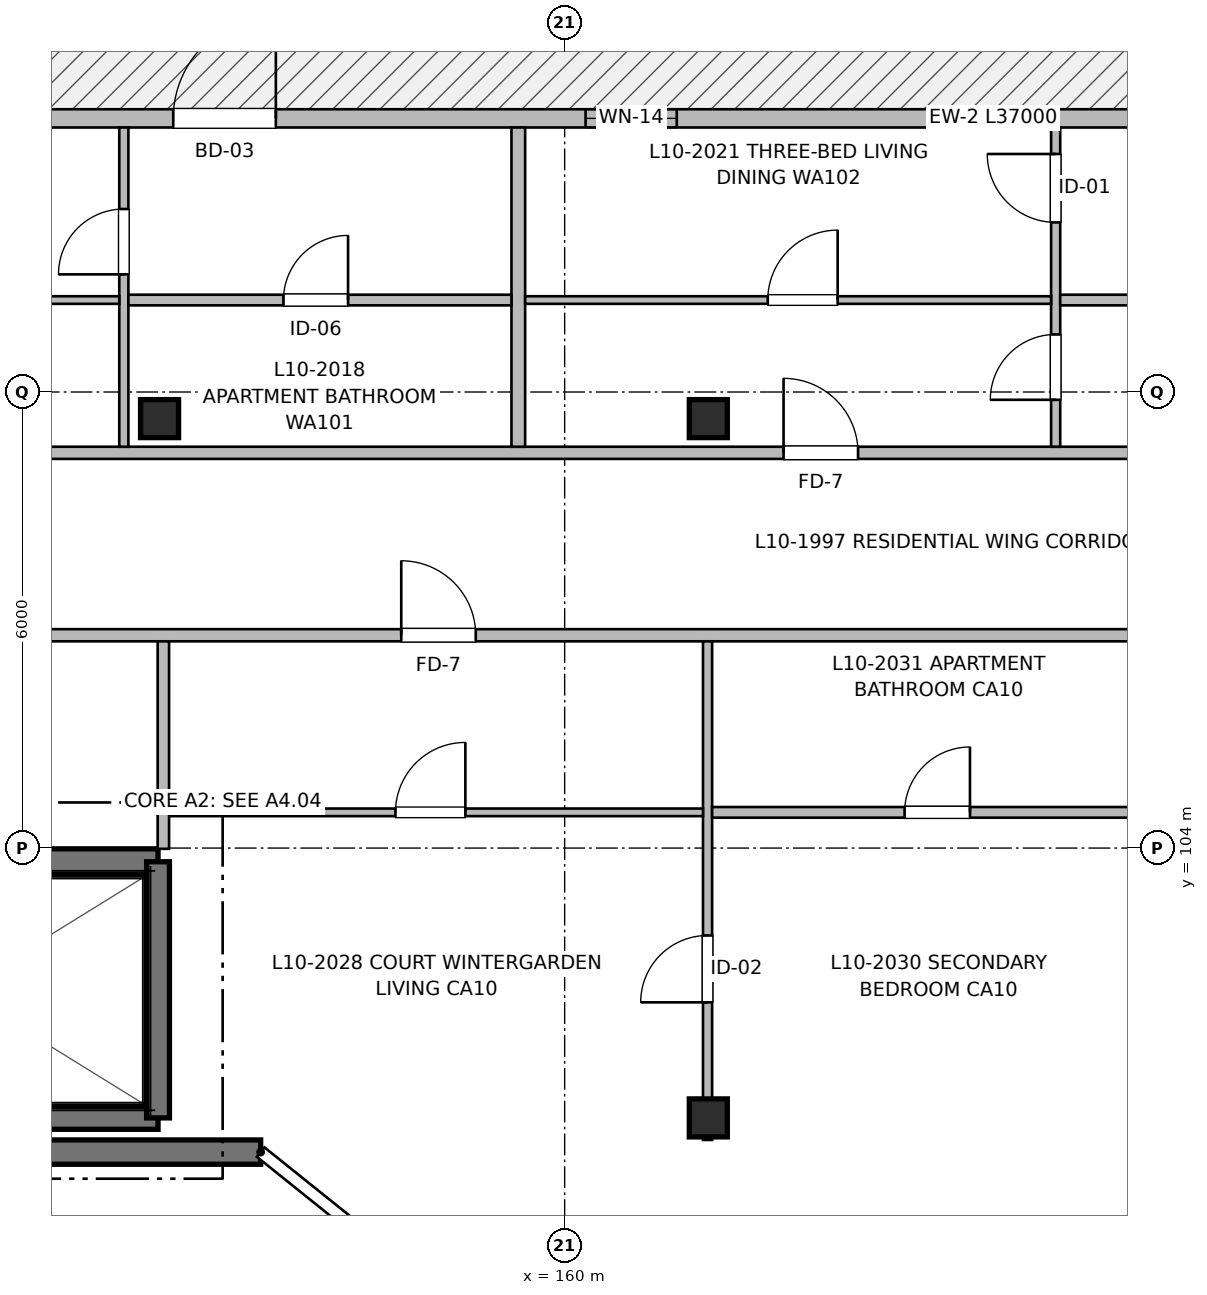
"""IFC4 building model, lengths in metres.
Left out: names, types, materials, properties, quantities, classifications, styles, units other than length and angle.
Written with IfcOpenShell. Run it as: python <this file> out.ifc"""

import sys

from ifc_helpers import new_model, si_unit, direction, frame, frame_2d, origin, origin_2d, place, context, subcontext, project, spatial, rectangle, extrude, element, fill, save


model = new_model("IFC4")
c1 = context("Model", 3, precision=1e-05, world=origin(), true_north=direction((0.0, 1.0)))
c2 = subcontext(c1, "Body", "Model", "MODEL_VIEW")
j1 = project(units=[si_unit("LENGTHUNIT", "METRE"), si_unit("PLANEANGLEUNIT", "RADIAN")], contexts=[c1])
p1 = place(None, origin())
s1 = spatial("IfcSite", under=j1, at=p1, CompositionType="ELEMENT")
p2 = place(p1, origin())
s2 = spatial("IfcBuilding", under=s1, at=p2, CompositionType="ELEMENT")
p3 = place(p2, frame((0.0, 0.0, 32.96)))
s3 = spatial("IfcBuildingStorey", under=s2, at=p3, CompositionType="ELEMENT", Elevation=32.96)
for number, where, z_axis, x_axis in (
    (1, (154.67, 109.65, 0.0), (0.0, 0.0, 1.0), (1.0, 0.0, 0.0)),
    (2, (161.89, 100.45, 0.0), (0.0, 0.0, 1.0), (1.0, 0.0, 0.0)),
    (3, (161.89, 109.65, 0.0), (0.0, 0.0, 1.0), (1.0, 0.0, 0.0)),
):
    element("IfcColumn", number, at=place(p3, frame(where, z_axis=z_axis, x_axis=x_axis)), inside=s3, PredefinedType="COLUMN", context=c2, shape_type="SweptSolid", body=[
        extrude(rectangle(XDim=0.5, YDim=0.5, at=origin_2d()), origin(), (0.0, 0.0, 1.0), 3.2),
    ])
p4 = place(p3, frame((147.75, 100.45, 0.0), z_axis=(0.0, 0.0, 1.0), x_axis=(1.0, 0.0, 0.0)))
e4 = element("IfcWall", 4, at=p4, inside=s3, PredefinedType="SHEAR", context=c2, shape_type="SweptSolid", body=[
    extrude(rectangle(XDim=6.9, YDim=0.3, at=frame_2d((3.45, 0.0))), origin(), (0.0, 0.0, 1.0), 3.2),
])
p5 = place(p3, frame((154.65, 103.82, 0.0), z_axis=(0.0, 0.0, 1.0), x_axis=(-1.0, 0.0, 0.0)))
e5 = element("IfcWall", 5, at=p5, inside=s3, PredefinedType="SHEAR", context=c2, shape_type="SweptSolid", body=[
    extrude(rectangle(XDim=6.9, YDim=0.34, at=frame_2d((3.45, 0.0))), origin(), (0.0, 0.0, 1.0), 3.2),
])
p6 = place(p5, frame((5.25, 0.0, 0.0)))
e6 = element("IfcOpeningElement", 6, at=p6, cuts=e5, PredefinedType="OPENING", context=c2, shape_type="SweptSolid", body=[
    extrude(rectangle(XDim=1.05, YDim=2.15, at=frame_2d((0.525, 1.075))), frame((0.0, 0.18, 0.0), z_axis=(0.0, -1.0, 0.0), x_axis=(1.0, 0.0, 0.0)), (0.0, 0.0, 1.0), 0.36),
])
p7 = place(p3, frame((154.65, 100.45, 0.0), z_axis=(0.0, 0.0, 1.0), x_axis=(0.0, 1.0, 0.0)))
e7 = element("IfcWall", 7, at=p7, inside=s3, PredefinedType="SHEAR", context=c2, shape_type="SweptSolid", body=[
    extrude(rectangle(XDim=3.37, YDim=0.3, at=frame_2d((1.685, 0.0))), origin(), (0.0, 0.0, 1.0), 3.2),
])
p8 = place(p3, frame((147.0, 113.6, 0.0), z_axis=(0.0, 0.0, 1.0), x_axis=(1.0, 0.0, 0.0)))
e8 = element("IfcWall", 8, at=p8, inside=s3, PredefinedType="SOLIDWALL", context=c2, shape_type="SweptSolid", body=[
    extrude(rectangle(XDim=37.0, YDim=0.24, at=frame_2d((18.5, 0.0))), origin(), (0.0, 0.0, 1.0), 2.98),
])
p9 = place(p8, frame((7.85, 0.0, 0.0)))
e9 = element("IfcOpeningElement", 9, at=p9, cuts=e8, PredefinedType="OPENING", context=c2, shape_type="SweptSolid", body=[
    extrude(rectangle(XDim=1.35, YDim=2.2, at=frame_2d((0.675, 1.1))), frame((0.0, 0.13, 0.0), z_axis=(0.0, -1.0, 0.0), x_axis=(1.0, 0.0, 0.0)), (0.0, 0.0, 1.0), 0.26),
])
p10 = place(p8, frame((4.1, 0.0, 0.9)))
e10 = element("IfcOpeningElement", 10, at=p10, cuts=e8, PredefinedType="OPENING", context=c2, shape_type="SweptSolid", body=[
    extrude(rectangle(XDim=1.05, YDim=1.15, at=frame_2d((0.525, 0.575))), frame((0.0, 0.13, 0.0), z_axis=(0.0, -1.0, 0.0), x_axis=(1.0, 0.0, 0.0)), (0.0, 0.0, 1.0), 0.26),
])
p11 = place(p8, frame((13.275, 0.0, 0.9)))
e11 = element("IfcOpeningElement", 11, at=p11, cuts=e8, PredefinedType="OPENING", context=c2, shape_type="SweptSolid", body=[
    extrude(rectangle(XDim=1.2, YDim=1.05, at=frame_2d((0.6, 0.525))), frame((0.0, 0.13, 0.0), z_axis=(0.0, -1.0, 0.0), x_axis=(1.0, 0.0, 0.0)), (0.0, 0.0, 1.0), 0.26),
])
p12 = place(p8, frame((22.8, 0.0, 0.9)))
e12 = element("IfcOpeningElement", 12, at=p12, cuts=e8, PredefinedType="OPENING", context=c2, shape_type="SweptSolid", body=[
    extrude(rectangle(XDim=0.65, YDim=0.95, at=frame_2d((0.325, 0.475))), frame((0.0, 0.13, 0.0), z_axis=(0.0, -1.0, 0.0), x_axis=(1.0, 0.0, 0.0)), (0.0, 0.0, 1.0), 0.26),
])
p13 = place(p8, frame((32.275, 0.0, 0.62)))
e13 = element("IfcOpeningElement", 13, at=p13, cuts=e8, PredefinedType="OPENING", context=c2, shape_type="SweptSolid", body=[
    extrude(rectangle(XDim=1.1, YDim=1.6, at=frame_2d((0.55, 0.8))), frame((0.0, 0.13, 0.0), z_axis=(0.0, -1.0, 0.0), x_axis=(1.0, 0.0, 0.0)), (0.0, 0.0, 1.0), 0.26),
])
p14 = place(p8, frame((27.445, 0.0, 0.82)))
e14 = element("IfcOpeningElement", 14, at=p14, cuts=e8, PredefinedType="OPENING", context=c2, shape_type="SweptSolid", body=[
    extrude(rectangle(XDim=1.5, YDim=1.4, at=frame_2d((0.75, 0.7))), frame((0.0, 0.13, 0.0), z_axis=(0.0, -1.0, 0.0), x_axis=(1.0, 0.0, 0.0)), (0.0, 0.0, 1.0), 0.26),
])
p15 = place(p3, frame((156.0, 100.0, 0.0), z_axis=(0.0, 0.0, 1.0), x_axis=(-1.0, 0.0, 0.0)))
e15 = element("IfcWall", 15, at=p15, inside=s3, PredefinedType="SHEAR", context=c2, shape_type="SweptSolid", body=[
    extrude(rectangle(XDim=9.0, YDim=0.32, at=frame_2d((4.5, 0.0))), origin(), (0.0, 0.0, 1.0), 2.98),
])
p16 = place(p15, frame((3.975, 0.0, 0.9)))
e16 = element("IfcOpeningElement", 16, at=p16, cuts=e15, PredefinedType="OPENING", context=c2, shape_type="SweptSolid", body=[
    extrude(rectangle(XDim=1.05, YDim=1.15, at=frame_2d((0.525, 0.575))), frame((0.0, 0.17, 0.0), z_axis=(0.0, -1.0, 0.0), x_axis=(1.0, 0.0, 0.0)), (0.0, 0.0, 1.0), 0.34),
])
p17 = place(p3, frame((147.16, 106.8, 0.0), z_axis=(0.0, 0.0, 1.0), x_axis=(1.0, 0.0, 0.0)))
e17 = element("IfcWall", 17, at=p17, inside=s3, PredefinedType="PARTITIONING", context=c2, shape_type="SweptSolid", body=[
    extrude(rectangle(XDim=27.64, YDim=0.16, at=frame_2d((13.82, 0.0))), origin(), (0.0, 0.0, 1.0), 2.935),
])
p18 = place(p17, frame((3.515, 0.0, 0.0)))
e18 = element("IfcOpeningElement", 18, at=p18, cuts=e17, PredefinedType="OPENING", context=c2, shape_type="SweptSolid", body=[
    extrude(rectangle(XDim=1.05, YDim=2.15, at=frame_2d((0.525, 1.075))), frame((0.0, 0.09, 0.0), z_axis=(0.0, -1.0, 0.0), x_axis=(1.0, 0.0, 0.0)), (0.0, 0.0, 1.0), 0.18),
])
p19 = place(p17, frame((10.69, 0.0, 0.0)))
e19 = element("IfcOpeningElement", 19, at=p19, cuts=e17, PredefinedType="OPENING", context=c2, shape_type="SweptSolid", body=[
    extrude(rectangle(XDim=0.98, YDim=2.15, at=frame_2d((0.49, 1.075))), frame((0.0, 0.09, 0.0), z_axis=(0.0, -1.0, 0.0), x_axis=(1.0, 0.0, 0.0)), (0.0, 0.0, 1.0), 0.18),
])
p20 = place(p3, frame((147.16, 109.2, 0.0), z_axis=(0.0, 0.0, 1.0), x_axis=(1.0, 0.0, 0.0)))
e20 = element("IfcWall", 20, at=p20, inside=s3, PredefinedType="PARTITIONING", context=c2, shape_type="SweptSolid", body=[
    extrude(rectangle(XDim=36.68, YDim=0.16, at=frame_2d((18.34, 0.0))), origin(), (0.0, 0.0, 1.0), 2.935),
])
p21 = place(p20, frame((3.03, 0.0, 0.0)))
e21 = element("IfcOpeningElement", 21, at=p21, cuts=e20, PredefinedType="OPENING", context=c2, shape_type="SweptSolid", body=[
    extrude(rectangle(XDim=0.98, YDim=2.15, at=frame_2d((0.49, 1.075))), frame((0.0, 0.09, 0.0), z_axis=(0.0, -1.0, 0.0), x_axis=(1.0, 0.0, 0.0)), (0.0, 0.0, 1.0), 0.18),
])
p22 = place(p20, frame((15.72, 0.0, 0.0)))
e22 = element("IfcOpeningElement", 22, at=p22, cuts=e20, PredefinedType="OPENING", context=c2, shape_type="SweptSolid", body=[
    extrude(rectangle(XDim=0.98, YDim=2.15, at=frame_2d((0.49, 1.075))), frame((0.0, 0.09, 0.0), z_axis=(0.0, -1.0, 0.0), x_axis=(1.0, 0.0, 0.0)), (0.0, 0.0, 1.0), 0.18),
])
p23 = place(p20, frame((27.57, 0.0, 0.0)))
e23 = element("IfcOpeningElement", 23, at=p23, cuts=e20, PredefinedType="OPENING", context=c2, shape_type="SweptSolid", body=[
    extrude(rectangle(XDim=0.98, YDim=2.15, at=frame_2d((0.49, 1.075))), frame((0.0, 0.09, 0.0), z_axis=(0.0, -1.0, 0.0), x_axis=(1.0, 0.0, 0.0)), (0.0, 0.0, 1.0), 0.18),
])
p24 = place(p3, frame((154.72, 103.99, 0.0), z_axis=(0.0, 0.0, 1.0), x_axis=(0.0, 1.0, 0.0)))
e24 = element("IfcWall", 24, at=p24, inside=s3, PredefinedType="PARTITIONING", context=c2, shape_type="SweptSolid", body=[
    extrude(rectangle(XDim=2.73, YDim=0.15, at=frame_2d((1.365, 0.0))), origin(), (0.0, 0.0, 1.0), 2.935),
])
p25 = place(p3, frame((159.39, 109.28, 0.0), z_axis=(0.0, 0.0, 1.0), x_axis=(0.0, 1.0, 0.0)))
e25 = element("IfcWall", 25, at=p25, inside=s3, PredefinedType="PARTITIONING", context=c2, shape_type="SweptSolid", body=[
    extrude(rectangle(XDim=4.2, YDim=0.18, at=frame_2d((2.1, 0.0))), origin(), (0.0, 0.0, 1.0), 2.935),
])
p26 = place(p3, frame((154.2, 109.28, 0.0), z_axis=(0.0, 0.0, 1.0), x_axis=(0.0, 1.0, 0.0)))
e26 = element("IfcWall", 26, at=p26, inside=s3, PredefinedType="PARTITIONING", context=c2, shape_type="SweptSolid", body=[
    extrude(rectangle(XDim=4.2, YDim=0.12, at=frame_2d((2.1, 0.0))), origin(), (0.0, 0.0, 1.0), 2.935),
])
p27 = place(p26, frame((2.268, 0.0, 0.0)))
e27 = element("IfcOpeningElement", 27, at=p27, cuts=e26, PredefinedType="OPENING", context=c2, shape_type="SweptSolid", body=[
    extrude(rectangle(XDim=0.86, YDim=2.1, at=frame_2d((0.43, 1.05))), frame((0.0, 0.07, 0.0), z_axis=(0.0, -1.0, 0.0), x_axis=(1.0, 0.0, 0.0)), (0.0, 0.0, 1.0), 0.14),
])
p28 = place(p3, frame((154.26, 111.21, 0.0), z_axis=(0.0, 0.0, 1.0), x_axis=(1.0, 0.0, 0.0)))
e28 = element("IfcWall", 28, at=p28, inside=s3, PredefinedType="PARTITIONING", context=c2, shape_type="SweptSolid", body=[
    extrude(rectangle(XDim=5.04, YDim=0.14, at=frame_2d((2.52, 0.0))), origin(), (0.0, 0.0, 1.0), 2.935),
])
p29 = place(p28, frame((2.04, 0.0, 0.0)))
e29 = element("IfcOpeningElement", 29, at=p29, cuts=e28, PredefinedType="OPENING", context=c2, shape_type="SweptSolid", body=[
    extrude(rectangle(XDim=0.85, YDim=2.05, at=frame_2d((0.425, 1.025))), frame((0.0, 0.08, 0.0), z_axis=(0.0, -1.0, 0.0), x_axis=(1.0, 0.0, 0.0)), (0.0, 0.0, 1.0), 0.16),
])
p30 = place(p3, frame((147.16, 111.21, 0.0), z_axis=(0.0, 0.0, 1.0), x_axis=(1.0, 0.0, 0.0)))
e30 = element("IfcWall", 30, at=p30, inside=s3, PredefinedType="PARTITIONING", context=c2, shape_type="SweptSolid", body=[
    extrude(rectangle(XDim=6.98, YDim=0.1, at=frame_2d((3.49, 0.0))), origin(), (0.0, 0.0, 1.0), 2.935),
])
p31 = place(p30, frame((2.816, 0.0, 0.0)))
e31 = element("IfcOpeningElement", 31, at=p31, cuts=e30, PredefinedType="OPENING", context=c2, shape_type="SweptSolid", body=[
    extrude(rectangle(XDim=0.92, YDim=2.1, at=frame_2d((0.46, 1.05))), frame((0.0, 0.06, 0.0), z_axis=(0.0, -1.0, 0.0), x_axis=(1.0, 0.0, 0.0)), (0.0, 0.0, 1.0), 0.12),
])
p32 = place(p3, frame((166.46, 109.28, 0.0), z_axis=(0.0, 0.0, 1.0), x_axis=(0.0, 1.0, 0.0)))
e32 = element("IfcWall", 32, at=p32, inside=s3, PredefinedType="PARTITIONING", context=c2, shape_type="SweptSolid", body=[
    extrude(rectangle(XDim=4.2, YDim=0.12, at=frame_2d((2.1, 0.0))), origin(), (0.0, 0.0, 1.0), 2.935),
])
p33 = place(p32, frame((0.618, 0.0, 0.0)))
e33 = element("IfcOpeningElement", 33, at=p33, cuts=e32, PredefinedType="OPENING", context=c2, shape_type="SweptSolid", body=[
    extrude(rectangle(XDim=0.86, YDim=2.1, at=frame_2d((0.43, 1.05))), frame((0.0, 0.07, 0.0), z_axis=(0.0, -1.0, 0.0), x_axis=(1.0, 0.0, 0.0)), (0.0, 0.0, 1.0), 0.14),
])
p34 = place(p32, frame((2.951, 0.0, 0.0)))
e34 = element("IfcOpeningElement", 34, at=p34, cuts=e32, PredefinedType="OPENING", context=c2, shape_type="SweptSolid", body=[
    extrude(rectangle(XDim=0.9, YDim=2.1, at=frame_2d((0.45, 1.05))), frame((0.0, 0.07, 0.0), z_axis=(0.0, -1.0, 0.0), x_axis=(1.0, 0.0, 0.0)), (0.0, 0.0, 1.0), 0.14),
])
p35 = place(p3, frame((166.52, 111.21, 0.0), z_axis=(0.0, 0.0, 1.0), x_axis=(1.0, 0.0, 0.0)))
e35 = element("IfcWall", 35, at=p35, inside=s3, PredefinedType="PARTITIONING", context=c2, shape_type="SweptSolid", body=[
    extrude(rectangle(XDim=5.0, YDim=0.14, at=frame_2d((2.5, 0.0))), origin(), (0.0, 0.0, 1.0), 2.935),
])
p36 = place(p35, frame((3.224, 0.0, 0.0)))
e36 = element("IfcOpeningElement", 36, at=p36, cuts=e35, PredefinedType="OPENING", context=c2, shape_type="SweptSolid", body=[
    extrude(rectangle(XDim=0.85, YDim=2.05, at=frame_2d((0.425, 1.025))), frame((0.0, 0.08, 0.0), z_axis=(0.0, -1.0, 0.0), x_axis=(1.0, 0.0, 0.0)), (0.0, 0.0, 1.0), 0.16),
])
p37 = place(p3, frame((159.48, 111.21, 0.0), z_axis=(0.0, 0.0, 1.0), x_axis=(1.0, 0.0, 0.0)))
e37 = element("IfcWall", 37, at=p37, inside=s3, PredefinedType="PARTITIONING", context=c2, shape_type="SweptSolid", body=[
    extrude(rectangle(XDim=6.92, YDim=0.1, at=frame_2d((3.46, 0.0))), origin(), (0.0, 0.0, 1.0), 2.935),
])
p38 = place(p37, frame((3.192, 0.0, 0.0)))
e38 = element("IfcOpeningElement", 38, at=p38, cuts=e37, PredefinedType="OPENING", context=c2, shape_type="SweptSolid", body=[
    extrude(rectangle(XDim=0.92, YDim=2.1, at=frame_2d((0.46, 1.05))), frame((0.0, 0.06, 0.0), z_axis=(0.0, -1.0, 0.0), x_axis=(1.0, 0.0, 0.0)), (0.0, 0.0, 1.0), 0.12),
])
p39 = place(p3, frame((161.88, 100.16, 0.0), z_axis=(0.0, 0.0, 1.0), x_axis=(0.0, 1.0, 0.0)))
e39 = element("IfcWall", 39, at=p39, inside=s3, PredefinedType="PARTITIONING", context=c2, shape_type="SweptSolid", body=[
    extrude(rectangle(XDim=6.56, YDim=0.12, at=frame_2d((3.28, 0.0))), origin(), (0.0, 0.0, 1.0), 2.68),
])
p40 = place(p39, frame((1.81, 0.0, 0.0)))
e40 = element("IfcOpeningElement", 40, at=p40, cuts=e39, PredefinedType="OPENING", context=c2, shape_type="SweptSolid", body=[
    extrude(rectangle(XDim=0.88, YDim=2.1, at=frame_2d((0.44, 1.05))), frame((0.0, 0.07, 0.0), z_axis=(0.0, -1.0, 0.0), x_axis=(1.0, 0.0, 0.0)), (0.0, 0.0, 1.0), 0.14),
])
p41 = place(p3, frame((161.94, 104.47, 0.0), z_axis=(0.0, 0.0, 1.0), x_axis=(1.0, 0.0, 0.0)))
e41 = element("IfcWall", 41, at=p41, inside=s3, PredefinedType="PARTITIONING", context=c2, shape_type="SweptSolid", body=[
    extrude(rectangle(XDim=5.97, YDim=0.14, at=frame_2d((2.985, 0.0))), origin(), (0.0, 0.0, 1.0), 2.935),
])
p42 = place(p41, frame((2.533, 0.0, 0.0)))
e42 = element("IfcOpeningElement", 42, at=p42, cuts=e41, PredefinedType="OPENING", context=c2, shape_type="SweptSolid", body=[
    extrude(rectangle(XDim=0.86, YDim=2.1, at=frame_2d((0.43, 1.05))), frame((0.0, 0.08, 0.0), z_axis=(0.0, -1.0, 0.0), x_axis=(1.0, 0.0, 0.0)), (0.0, 0.0, 1.0), 0.16),
])
p43 = place(p3, frame((154.8, 104.47, 0.0), z_axis=(0.0, 0.0, 1.0), x_axis=(1.0, 0.0, 0.0)))
e43 = element("IfcWall", 43, at=p43, inside=s3, PredefinedType="PARTITIONING", context=c2, shape_type="SweptSolid", body=[
    extrude(rectangle(XDim=7.02, YDim=0.1, at=frame_2d((3.51, 0.0))), origin(), (0.0, 0.0, 1.0), 2.935),
])
p44 = place(p43, frame((2.974, 0.0, 0.0)))
e44 = element("IfcOpeningElement", 44, at=p44, cuts=e43, PredefinedType="OPENING", context=c2, shape_type="SweptSolid", body=[
    extrude(rectangle(XDim=0.92, YDim=2.1, at=frame_2d((0.46, 1.05))), frame((0.0, 0.06, 0.0), z_axis=(0.0, -1.0, 0.0), x_axis=(1.0, 0.0, 0.0)), (0.0, 0.0, 1.0), 0.12),
])
p45 = place(p9, origin())
e45 = element("IfcDoor", 45, at=p45, inside=s3, OperationType="SINGLE_SWING_RIGHT", PredefinedType="DOOR", context=c2, shape_type="SweptSolid", body=[
    extrude(rectangle(XDim=1.35, YDim=2.2, at=frame_2d((0.675, 1.1))), frame((0.0, 0.025, 0.0), z_axis=(0.0, -1.0, 0.0), x_axis=(1.0, 0.0, 0.0)), (0.0, 0.0, 1.0), 0.05),
])
fill(e9, e45)
p46 = place(p11, origin())
e46 = element("IfcWindow", 46, at=p46, inside=s3, PartitioningType="SINGLE_PANEL", PredefinedType="WINDOW", context=c2, shape_type="SweptSolid", body=[
    extrude(rectangle(XDim=1.2, YDim=1.05, at=frame_2d((0.6, 0.525))), frame((0.0, 0.03, 0.0), z_axis=(0.0, -1.0, 0.0), x_axis=(1.0, 0.0, 0.0)), (0.0, 0.0, 1.0), 0.06),
])
fill(e11, e46)
p47 = place(p27, origin())
e47 = element("IfcDoor", 47, at=p47, inside=s3, OperationType="SINGLE_SWING_LEFT", PredefinedType="DOOR", context=c2, shape_type="SweptSolid", body=[
    extrude(rectangle(XDim=0.86, YDim=2.1, at=frame_2d((0.43, 1.05))), frame((0.0, 0.025, 0.0), z_axis=(0.0, -1.0, 0.0), x_axis=(1.0, 0.0, 0.0)), (0.0, 0.0, 1.0), 0.05),
])
fill(e27, e47)
p48 = place(p29, origin())
e48 = element("IfcDoor", 48, at=p48, inside=s3, OperationType="SINGLE_SWING_RIGHT", PredefinedType="DOOR", context=c2, shape_type="SweptSolid", body=[
    extrude(rectangle(XDim=0.85, YDim=2.05, at=frame_2d((0.425, 1.025))), frame((0.0, 0.025, 0.0), z_axis=(0.0, -1.0, 0.0), x_axis=(1.0, 0.0, 0.0)), (0.0, 0.0, 1.0), 0.05),
])
fill(e29, e48)
p49 = place(p22, origin())
e49 = element("IfcDoor", 49, at=p49, inside=s3, OperationType="SINGLE_SWING_LEFT", PredefinedType="DOOR", context=c2, shape_type="SweptSolid", body=[
    extrude(rectangle(XDim=0.98, YDim=2.15, at=frame_2d((0.49, 1.075))), frame((0.0, 0.025, 0.0), z_axis=(0.0, -1.0, 0.0), x_axis=(1.0, 0.0, 0.0)), (0.0, 0.0, 1.0), 0.05),
])
fill(e22, e49)
p50 = place(p38, origin())
e50 = element("IfcDoor", 50, at=p50, inside=s3, OperationType="SINGLE_SWING_RIGHT", PredefinedType="DOOR", context=c2, shape_type="SweptSolid", body=[
    extrude(rectangle(XDim=0.92, YDim=2.1, at=frame_2d((0.46, 1.05))), frame((0.0, 0.025, 0.0), z_axis=(0.0, -1.0, 0.0), x_axis=(1.0, 0.0, 0.0)), (0.0, 0.0, 1.0), 0.05),
])
fill(e38, e50)
p51 = place(p33, origin())
e51 = element("IfcDoor", 51, at=p51, inside=s3, OperationType="SINGLE_SWING_LEFT", PredefinedType="DOOR", context=c2, shape_type="SweptSolid", body=[
    extrude(rectangle(XDim=0.86, YDim=2.1, at=frame_2d((0.43, 1.05))), frame((0.0, 0.025, 0.0), z_axis=(0.0, -1.0, 0.0), x_axis=(1.0, 0.0, 0.0)), (0.0, 0.0, 1.0), 0.05),
])
fill(e33, e51)
p52 = place(p34, origin())
e52 = element("IfcDoor", 52, at=p52, inside=s3, OperationType="SINGLE_SWING_RIGHT", PredefinedType="DOOR", context=c2, shape_type="SweptSolid", body=[
    extrude(rectangle(XDim=0.9, YDim=2.1, at=frame_2d((0.45, 1.05))), frame((0.0, 0.025, 0.0), z_axis=(0.0, -1.0, 0.0), x_axis=(1.0, 0.0, 0.0)), (0.0, 0.0, 1.0), 0.05),
])
fill(e34, e52)
p53 = place(p19, origin())
e53 = element("IfcDoor", 53, at=p53, inside=s3, OperationType="SINGLE_SWING_LEFT", PredefinedType="DOOR", context=c2, shape_type="SweptSolid", body=[
    extrude(rectangle(XDim=0.98, YDim=2.15, at=frame_2d((0.49, 1.075))), frame((0.0, 0.025, 0.0), z_axis=(0.0, -1.0, 0.0), x_axis=(1.0, 0.0, 0.0)), (0.0, 0.0, 1.0), 0.05),
])
fill(e19, e53)
p54 = place(p44, origin())
e54 = element("IfcDoor", 54, at=p54, inside=s3, OperationType="SINGLE_SWING_RIGHT", PredefinedType="DOOR", context=c2, shape_type="SweptSolid", body=[
    extrude(rectangle(XDim=0.92, YDim=2.1, at=frame_2d((0.46, 1.05))), frame((0.0, 0.025, 0.0), z_axis=(0.0, -1.0, 0.0), x_axis=(1.0, 0.0, 0.0)), (0.0, 0.0, 1.0), 0.05),
])
fill(e44, e54)
p55 = place(p40, origin())
e55 = element("IfcDoor", 55, at=p55, inside=s3, OperationType="SINGLE_SWING_LEFT", PredefinedType="DOOR", context=c2, shape_type="SweptSolid", body=[
    extrude(rectangle(XDim=0.88, YDim=2.1, at=frame_2d((0.44, 1.05))), frame((0.0, 0.025, 0.0), z_axis=(0.0, -1.0, 0.0), x_axis=(1.0, 0.0, 0.0)), (0.0, 0.0, 1.0), 0.05),
])
fill(e40, e55)
p56 = place(p42, origin())
e56 = element("IfcDoor", 56, at=p56, inside=s3, OperationType="SINGLE_SWING_RIGHT", PredefinedType="DOOR", context=c2, shape_type="SweptSolid", body=[
    extrude(rectangle(XDim=0.86, YDim=2.1, at=frame_2d((0.43, 1.05))), frame((0.0, 0.025, 0.0), z_axis=(0.0, -1.0, 0.0), x_axis=(1.0, 0.0, 0.0)), (0.0, 0.0, 1.0), 0.05),
])
fill(e42, e56)
save(model, sys.argv[1])
